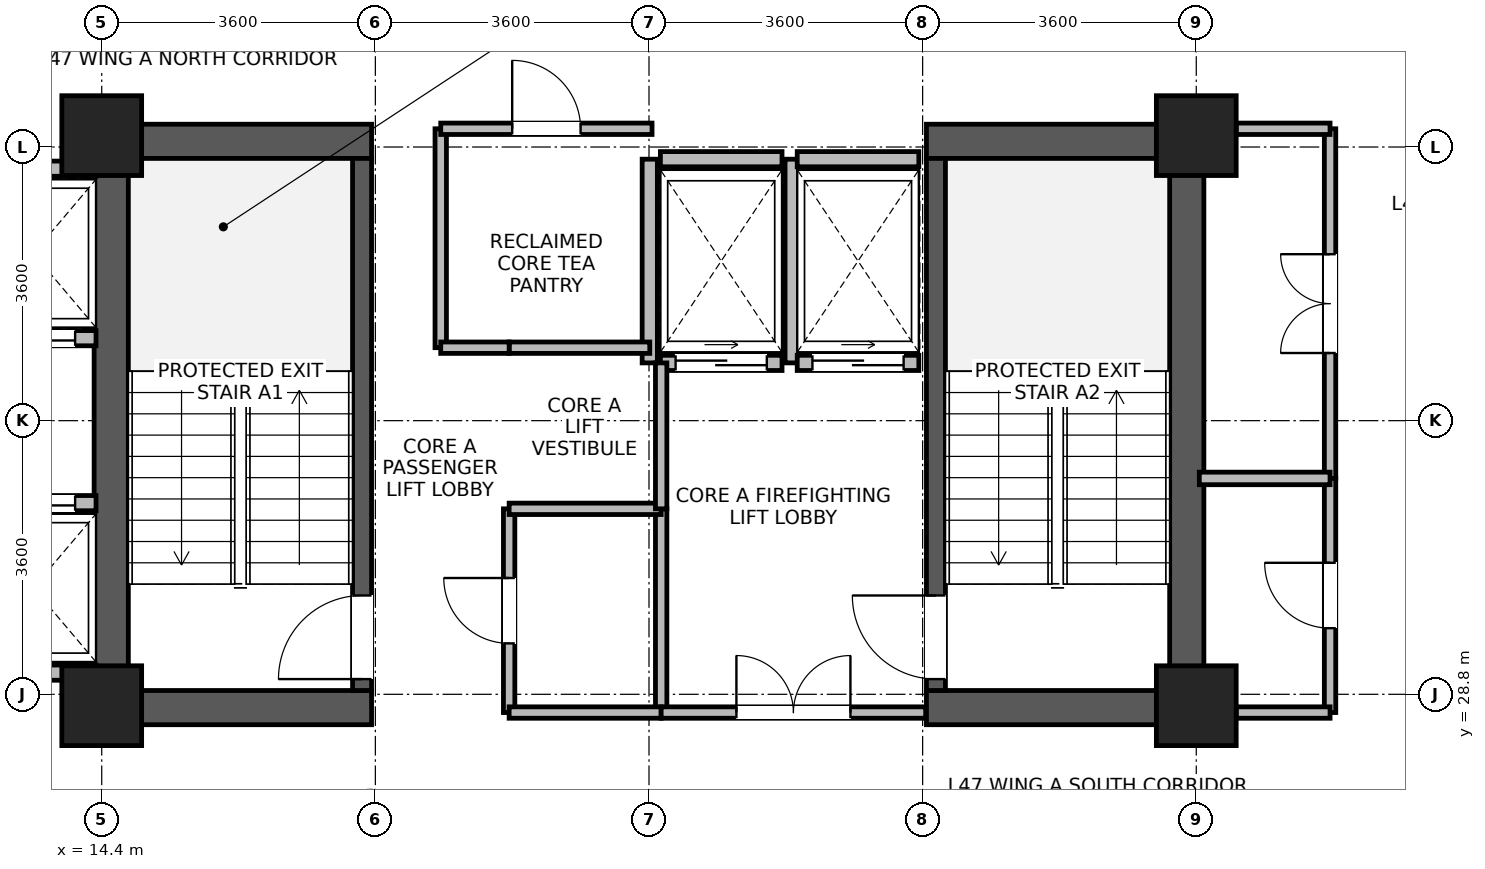
"""IFC4 building model, lengths in metres.
Left out: names, types, materials, properties, quantities, classifications, styles, units other than length and angle.
Written with IfcOpenShell. Run it as: python <this file> out.ifc"""

import sys

from ifc_helpers import new_model, si_unit, direction, frame, frame_2d, origin, origin_2d, place, context, subcontext, project, spatial, rectangle, extrude, source, transform, mapped, element, fill, save


model = new_model("IFC4")
c1 = context("Model", 3, precision=1e-05, world=origin(), true_north=direction((0.0, 1.0)))
c2 = subcontext(c1, "Body", "Model", "MODEL_VIEW")
j1 = project(units=[si_unit("LENGTHUNIT", "METRE"), si_unit("PLANEANGLEUNIT", "RADIAN")], contexts=[c1])
p1 = place(None, origin())
s1 = spatial("IfcSite", under=j1, at=p1, CompositionType="ELEMENT")
p2 = place(p1, origin())
s2 = spatial("IfcBuilding", under=s1, at=p2, CompositionType="ELEMENT")
p3 = place(p2, frame((0.0, 0.0, 184.6)))
s3 = spatial("IfcBuildingStorey", under=s2, at=p3, CompositionType="ELEMENT", Elevation=184.6)
for number, where, z_axis, x_axis in (
    (1, (14.525, 28.4, 0.0), (0.0, 0.0, 1.0), (0.0, 1.0, 0.0)),
    (2, (28.675, 28.4, 0.0), (0.0, 0.0, 1.0), (0.0, 1.0, 0.0)),
):
    element("IfcWall", number, at=place(p3, frame(where, z_axis=z_axis, x_axis=x_axis)), inside=s3, PredefinedType="SHEAR", context=c2, shape_type="SweptSolid", body=[
        extrude(rectangle(XDim=7.9, YDim=0.45, at=frame_2d((3.95, 0.0))), origin(), (0.0, 0.0, 1.0), 3.46),
    ])
for number, where, z_axis, x_axis in (
    (3, (14.75, 28.625, 0.0), (0.0, 0.0, 1.0), (1.0, 0.0, 0.0)),
    (4, (25.25, 28.625, 0.0), (0.0, 0.0, 1.0), (1.0, 0.0, 0.0)),
    (5, (14.75, 36.075, 0.0), (0.0, 0.0, 1.0), (1.0, 0.0, 0.0)),
    (6, (25.25, 36.075, 0.0), (0.0, 0.0, 1.0), (1.0, 0.0, 0.0)),
):
    element("IfcWall", number, at=place(p3, frame(where, z_axis=z_axis, x_axis=x_axis)), inside=s3, PredefinedType="SHEAR", context=c2, shape_type="SweptSolid", body=[
        extrude(rectangle(XDim=3.2, YDim=0.45, at=frame_2d((1.6, 0.0))), origin(), (0.0, 0.0, 1.0), 3.46),
    ])
p4 = place(p3, frame((17.825, 28.85, 0.0), z_axis=(0.0, 0.0, 1.0), x_axis=(0.0, 1.0, 0.0)))
e7 = element("IfcWall", 7, at=p4, inside=s3, PredefinedType="SHEAR", context=c2, shape_type="SweptSolid", body=[
    extrude(rectangle(XDim=7.0, YDim=0.25, at=frame_2d((3.5, 0.0))), origin(), (0.0, 0.0, 1.0), 3.46),
])
p5 = place(p4, frame((0.15, 0.0, 0.0)))
e8 = element("IfcOpeningElement", 8, at=p5, cuts=e7, PredefinedType="OPENING", context=c2, shape_type="SweptSolid", body=[
    extrude(rectangle(XDim=1.1, YDim=2.08, at=frame_2d((0.55, 1.04))), frame((0.0, 0.135, 0.0), z_axis=(0.0, -1.0, 0.0), x_axis=(1.0, 0.0, 0.0)), (0.0, 0.0, 1.0), 0.27),
])
p6 = place(p3, frame((25.375, 28.85, 0.0), z_axis=(0.0, 0.0, 1.0), x_axis=(0.0, 1.0, 0.0)))
e9 = element("IfcWall", 9, at=p6, inside=s3, PredefinedType="SHEAR", context=c2, shape_type="SweptSolid", body=[
    extrude(rectangle(XDim=7.0, YDim=0.25, at=frame_2d((3.5, 0.0))), origin(), (0.0, 0.0, 1.0), 3.46),
])
p7 = place(p6, frame((0.15, 0.0, 0.0)))
e10 = element("IfcOpeningElement", 10, at=p7, cuts=e9, PredefinedType="OPENING", context=c2, shape_type="SweptSolid", body=[
    extrude(rectangle(XDim=1.1, YDim=2.08, at=frame_2d((0.55, 1.04))), frame((0.0, 0.135, 0.0), z_axis=(0.0, -1.0, 0.0), x_axis=(1.0, 0.0, 0.0)), (0.0, 0.0, 1.0), 0.27),
])
m1 = source(origin(), c2, "Body", "SweptSolid", [
    extrude(rectangle(XDim=1.05, YDim=1.05, at=origin_2d()), origin(), (0.0, 0.0, 1.0), 3.7),
])
for number, where, z_axis, x_axis in (
    (11, (14.4, 28.65, 0.0), (0.0, 0.0, 1.0), (1.0, 0.0, 0.0)),
    (12, (14.4, 36.15, 0.0), (0.0, 0.0, 1.0), (1.0, 0.0, 0.0)),
    (13, (28.8, 28.65, 0.0), (0.0, 0.0, 1.0), (1.0, 0.0, 0.0)),
    (14, (28.8, 36.15, 0.0), (0.0, 0.0, 1.0), (1.0, 0.0, 0.0)),
):
    element("IfcColumn", number, at=place(p3, frame(where, z_axis=z_axis, x_axis=x_axis)), inside=s3, PredefinedType="COLUMN", context=c2, shape_type="MappedRepresentation", body=[
        mapped(m1, transform((0.0, 0.0, 0.0), x_axis=(1.0, 0.0, 0.0), y_axis=(0.0, 1.0, 0.0), z_axis=(0.0, 0.0, 1.0), scale=1.0)),
    ])
p8 = place(p3, frame((12.675, 33.485, 0.0), z_axis=(0.0, 0.0, 1.0), x_axis=(1.0, 0.0, 0.0)))
e15 = element("IfcWall", 15, at=p8, inside=s3, PredefinedType="PARTITIONING", context=c2, shape_type="SweptSolid", body=[
    extrude(rectangle(XDim=1.65, YDim=0.2, at=frame_2d((0.825, 0.0))), origin(), (0.0, 0.0, 1.0), 3.44),
])
p9 = place(p8, frame((0.275, 0.0, 0.0)))
e16 = element("IfcOpeningElement", 16, at=p9, cuts=e15, PredefinedType="OPENING", context=c2, shape_type="SweptSolid", body=[
    extrude(rectangle(XDim=1.1, YDim=2.12, at=frame_2d((0.55, 1.06))), frame((0.0, 0.11, 0.0), z_axis=(0.0, -1.0, 0.0), x_axis=(1.0, 0.0, 0.0)), (0.0, 0.0, 1.0), 0.22),
])
for number, where, z_axis, x_axis in (
    (17, (12.675, 35.715, 0.0), (0.0, 0.0, 1.0), (1.0, 0.0, 0.0)),
    (18, (12.675, 29.085, 0.0), (0.0, 0.0, 1.0), (1.0, 0.0, 0.0)),
):
    element("IfcWall", number, at=place(p3, frame(where, z_axis=z_axis, x_axis=x_axis)), inside=s3, PredefinedType="PARTITIONING", context=c2, shape_type="SweptSolid", body=[
        extrude(rectangle(XDim=1.65, YDim=0.2, at=frame_2d((0.825, 0.0))), origin(), (0.0, 0.0, 1.0), 3.44),
    ])
p10 = place(p3, frame((12.675, 31.315, 0.0), z_axis=(0.0, 0.0, 1.0), x_axis=(1.0, 0.0, 0.0)))
e19 = element("IfcWall", 19, at=p10, inside=s3, PredefinedType="PARTITIONING", context=c2, shape_type="SweptSolid", body=[
    extrude(rectangle(XDim=1.65, YDim=0.2, at=frame_2d((0.825, 0.0))), origin(), (0.0, 0.0, 1.0), 3.44),
])
p11 = place(p10, frame((0.275, 0.0, 0.0)))
e20 = element("IfcOpeningElement", 20, at=p11, cuts=e19, PredefinedType="OPENING", context=c2, shape_type="SweptSolid", body=[
    extrude(rectangle(XDim=1.1, YDim=2.12, at=frame_2d((0.55, 1.06))), frame((0.0, 0.11, 0.0), z_axis=(0.0, -1.0, 0.0), x_axis=(1.0, 0.0, 0.0)), (0.0, 0.0, 1.0), 0.22),
])
p12 = place(p3, frame((21.75, 33.16, 0.0), z_axis=(0.0, 0.0, 1.0), x_axis=(1.0, 0.0, 0.0)))
e21 = element("IfcWall", 21, at=p12, inside=s3, PredefinedType="PARTITIONING", context=c2, shape_type="SweptSolid", body=[
    extrude(rectangle(XDim=1.6, YDim=0.2, at=frame_2d((0.8, 0.0))), origin(), (0.0, 0.0, 1.0), 3.44),
])
p13 = place(p12, frame((0.2, 0.0, 0.0)))
e22 = element("IfcOpeningElement", 22, at=p13, cuts=e21, PredefinedType="OPENING", context=c2, shape_type="SweptSolid", body=[
    extrude(rectangle(XDim=1.2, YDim=2.12, at=frame_2d((0.6, 1.06))), frame((0.0, 0.11, 0.0), z_axis=(0.0, -1.0, 0.0), x_axis=(1.0, 0.0, 0.0)), (0.0, 0.0, 1.0), 0.22),
])
p14 = place(p3, frame((21.75, 35.84, 0.0), z_axis=(0.0, 0.0, 1.0), x_axis=(1.0, 0.0, 0.0)))
e23 = element("IfcWall", 23, at=p14, inside=s3, PredefinedType="PARTITIONING", context=c2, shape_type="SweptSolid", body=[
    extrude(rectangle(XDim=1.6, YDim=0.2, at=frame_2d((0.8, 0.0))), origin(), (0.0, 0.0, 1.0), 2.44),
])
for number, where, z_axis, x_axis in (
    (24, (21.61, 33.16, 0.0), (0.0, 0.0, 1.0), (0.0, 1.0, 0.0)),
    (25, (23.49, 33.16, 0.0), (0.0, 0.0, 1.0), (0.0, 1.0, 0.0)),
):
    element("IfcWall", number, at=place(p3, frame(where, z_axis=z_axis, x_axis=x_axis)), inside=s3, PredefinedType="PARTITIONING", context=c2, shape_type="SweptSolid", body=[
        extrude(rectangle(XDim=2.68, YDim=0.2, at=frame_2d((1.34, 0.0))), origin(), (0.0, 0.0, 1.0), 3.44),
    ])
p15 = place(p3, frame((23.55, 33.16, 0.0), z_axis=(0.0, 0.0, 1.0), x_axis=(1.0, 0.0, 0.0)))
e26 = element("IfcWall", 26, at=p15, inside=s3, PredefinedType="PARTITIONING", context=c2, shape_type="SweptSolid", body=[
    extrude(rectangle(XDim=1.6, YDim=0.2, at=frame_2d((0.8, 0.0))), origin(), (0.0, 0.0, 1.0), 3.44),
])
p16 = place(p15, frame((0.2, 0.0, 0.0)))
e27 = element("IfcOpeningElement", 27, at=p16, cuts=e26, PredefinedType="OPENING", context=c2, shape_type="SweptSolid", body=[
    extrude(rectangle(XDim=1.2, YDim=2.12, at=frame_2d((0.6, 1.06))), frame((0.0, 0.11, 0.0), z_axis=(0.0, -1.0, 0.0), x_axis=(1.0, 0.0, 0.0)), (0.0, 0.0, 1.0), 0.22),
])
p17 = place(p3, frame((23.55, 35.84, 0.0), z_axis=(0.0, 0.0, 1.0), x_axis=(1.0, 0.0, 0.0)))
e28 = element("IfcWall", 28, at=p17, inside=s3, PredefinedType="PARTITIONING", context=c2, shape_type="SweptSolid", body=[
    extrude(rectangle(XDim=1.6, YDim=0.2, at=frame_2d((0.8, 0.0))), origin(), (0.0, 0.0, 1.0), 2.44),
])
p18 = place(p3, frame((30.56, 31.64, 0.0), z_axis=(0.0, 0.0, 1.0), x_axis=(0.0, 1.0, 0.0)))
e29 = element("IfcWall", 29, at=p18, inside=s3, PredefinedType="PARTITIONING", context=c2, shape_type="SweptSolid", body=[
    extrude(rectangle(XDim=4.6, YDim=0.15, at=frame_2d((2.3, 0.0))), origin(), (0.0, 0.0, 1.0), 3.44),
])
p19 = place(p18, frame((1.65, 0.0, 0.0)))
e30 = element("IfcOpeningElement", 30, at=p19, cuts=e29, PredefinedType="OPENING", context=c2, shape_type="SweptSolid", body=[
    extrude(rectangle(XDim=1.3, YDim=2.12, at=frame_2d((0.65, 1.06))), frame((0.0, 0.085, 0.0), z_axis=(0.0, -1.0, 0.0), x_axis=(1.0, 0.0, 0.0)), (0.0, 0.0, 1.0), 0.17),
])
p20 = place(p3, frame((30.56, 28.56, 0.0), z_axis=(0.0, 0.0, 1.0), x_axis=(0.0, 1.0, 0.0)))
e31 = element("IfcWall", 31, at=p20, inside=s3, PredefinedType="PARTITIONING", context=c2, shape_type="SweptSolid", body=[
    extrude(rectangle(XDim=3.08, YDim=0.15, at=frame_2d((1.54, 0.0))), origin(), (0.0, 0.0, 1.0), 3.44),
])
p21 = place(p20, frame((1.11, 0.0, 0.0)))
e32 = element("IfcOpeningElement", 32, at=p21, cuts=e31, PredefinedType="OPENING", context=c2, shape_type="SweptSolid", body=[
    extrude(rectangle(XDim=0.86, YDim=2.02, at=frame_2d((0.43, 1.01))), frame((0.0, 0.085, 0.0), z_axis=(0.0, -1.0, 0.0), x_axis=(1.0, 0.0, 0.0)), (0.0, 0.0, 1.0), 0.17),
])
p22 = place(p3, frame((18.86, 33.36, 0.0), z_axis=(0.0, 0.0, 1.0), x_axis=(0.0, 1.0, 0.0)))
e33 = element("IfcWall", 33, at=p22, inside=s3, PredefinedType="PARTITIONING", context=c2, shape_type="SweptSolid", body=[
    extrude(rectangle(XDim=2.88, YDim=0.15, at=frame_2d((1.44, 0.0))), origin(), (0.0, 0.0, 1.0), 3.44),
])
p23 = place(p3, frame((18.86, 36.24, 0.0), z_axis=(0.0, 0.0, 1.0), x_axis=(1.0, 0.0, 0.0)))
e34 = element("IfcWall", 34, at=p23, inside=s3, PredefinedType="PARTITIONING", context=c2, shape_type="SweptSolid", body=[
    extrude(rectangle(XDim=2.78, YDim=0.15, at=frame_2d((1.39, 0.0))), origin(), (0.0, 0.0, 1.0), 2.44),
])
p24 = place(p23, frame((0.94, 0.0, 0.0)))
e35 = element("IfcOpeningElement", 35, at=p24, cuts=e34, PredefinedType="OPENING", context=c2, shape_type="SweptSolid", body=[
    extrude(rectangle(XDim=0.9, YDim=2.08, at=frame_2d((0.45, 1.04))), frame((0.0, 0.085, 0.0), z_axis=(0.0, -1.0, 0.0), x_axis=(1.0, 0.0, 0.0)), (0.0, 0.0, 1.0), 0.17),
])
p25 = place(p3, frame((19.76, 28.56, 0.0), z_axis=(0.0, 0.0, 1.0), x_axis=(0.0, 1.0, 0.0)))
e36 = element("IfcWall", 36, at=p25, inside=s3, PredefinedType="PARTITIONING", context=c2, shape_type="SweptSolid", body=[
    extrude(rectangle(XDim=2.68, YDim=0.15, at=frame_2d((1.34, 0.0))), origin(), (0.0, 0.0, 1.0), 3.44),
])
p26 = place(p25, frame((0.91, 0.0, 0.0)))
e37 = element("IfcOpeningElement", 37, at=p26, cuts=e36, PredefinedType="OPENING", context=c2, shape_type="SweptSolid", body=[
    extrude(rectangle(XDim=0.86, YDim=2.02, at=frame_2d((0.43, 1.01))), frame((0.0, 0.085, 0.0), z_axis=(0.0, -1.0, 0.0), x_axis=(1.0, 0.0, 0.0)), (0.0, 0.0, 1.0), 0.17),
])
p27 = place(p3, frame((21.76, 28.56, 0.0), z_axis=(0.0, 0.0, 1.0), x_axis=(0.0, 1.0, 0.0)))
e38 = element("IfcWall", 38, at=p27, inside=s3, PredefinedType="PARTITIONING", context=c2, shape_type="SweptSolid", body=[
    extrude(rectangle(XDim=2.68, YDim=0.15, at=frame_2d((1.34, 0.0))), origin(), (0.0, 0.0, 1.0), 3.44),
])
p28 = place(p3, frame((19.76, 28.56, 0.0), z_axis=(0.0, 0.0, 1.0), x_axis=(1.0, 0.0, 0.0)))
e39 = element("IfcWall", 39, at=p28, inside=s3, PredefinedType="PARTITIONING", context=c2, shape_type="SweptSolid", body=[
    extrude(rectangle(XDim=2.0, YDim=0.15, at=frame_2d((1.0, 0.0))), origin(), (0.0, 0.0, 1.0), 2.44),
])
p29 = place(p3, frame((19.76, 31.24, 0.0), z_axis=(0.0, 0.0, 1.0), x_axis=(1.0, 0.0, 0.0)))
e40 = element("IfcWall", 40, at=p29, inside=s3, PredefinedType="PARTITIONING", context=c2, shape_type="SweptSolid", body=[
    extrude(rectangle(XDim=2.0, YDim=0.15, at=frame_2d((1.0, 0.0))), origin(), (0.0, 0.0, 1.0), 3.44),
])
p30 = place(p3, frame((19.76, 33.36, 0.0), z_axis=(0.0, 0.0, 1.0), x_axis=(1.0, 0.0, 0.0)))
e41 = element("IfcWall", 41, at=p30, inside=s3, PredefinedType="PARTITIONING", context=c2, shape_type="SweptSolid", body=[
    extrude(rectangle(XDim=1.85, YDim=0.15, at=frame_2d((0.925, 0.0))), origin(), (0.0, 0.0, 1.0), 3.44),
])
for number, where, z_axis, x_axis in (
    (42, (29.325, 28.56, 0.0), (0.0, 0.0, 1.0), (1.0, 0.0, 0.0)),
    (43, (29.325, 36.24, 0.0), (0.0, 0.0, 1.0), (1.0, 0.0, 0.0)),
):
    element("IfcWall", number, at=place(p3, frame(where, z_axis=z_axis, x_axis=x_axis)), inside=s3, PredefinedType="PARTITIONING", context=c2, shape_type="SweptSolid", body=[
        extrude(rectangle(XDim=1.235, YDim=0.15, at=frame_2d((0.618, 0.0))), origin(), (0.0, 0.0, 1.0), 2.84),
    ])
p31 = place(p3, frame((18.86, 33.36, 0.0), z_axis=(0.0, 0.0, 1.0), x_axis=(1.0, 0.0, 0.0)))
e44 = element("IfcWall", 44, at=p31, inside=s3, PredefinedType="PARTITIONING", context=c2, shape_type="SweptSolid", body=[
    extrude(rectangle(XDim=0.9, YDim=0.15, at=frame_2d((0.45, 0.0))), origin(), (0.0, 0.0, 1.0), 3.44),
])
p32 = place(p3, frame((21.76, 28.56, 0.0), z_axis=(0.0, 0.0, 1.0), x_axis=(1.0, 0.0, 0.0)))
e45 = element("IfcWall", 45, at=p32, inside=s3, PredefinedType="PARTITIONING", context=c2, shape_type="SweptSolid", body=[
    extrude(rectangle(XDim=3.48, YDim=0.15, at=frame_2d((1.74, 0.0))), origin(), (0.0, 0.0, 1.0), 2.44),
])
p33 = place(p32, frame((0.99, 0.0, 0.0)))
e46 = element("IfcOpeningElement", 46, at=p33, cuts=e45, PredefinedType="OPENING", context=c2, shape_type="SweptSolid", body=[
    extrude(rectangle(XDim=1.5, YDim=2.1, at=frame_2d((0.75, 1.05))), frame((0.0, 0.085, 0.0), z_axis=(0.0, -1.0, 0.0), x_axis=(1.0, 0.0, 0.0)), (0.0, 0.0, 1.0), 0.17),
])
p34 = place(p3, frame((21.76, 31.24, 0.0), z_axis=(0.0, 0.0, 1.0), x_axis=(0.0, 1.0, 0.0)))
e47 = element("IfcWall", 47, at=p34, inside=s3, PredefinedType="PARTITIONING", context=c2, shape_type="SweptSolid", body=[
    extrude(rectangle(XDim=1.92, YDim=0.15, at=frame_2d((0.96, 0.0))), origin(), (0.0, 0.0, 1.0), 3.44),
])
p35 = place(p3, frame((28.84, 31.64, 0.0), z_axis=(0.0, 0.0, 1.0), x_axis=(1.0, 0.0, 0.0)))
e48 = element("IfcWall", 48, at=p35, inside=s3, PredefinedType="PARTITIONING", context=c2, shape_type="SweptSolid", body=[
    extrude(rectangle(XDim=1.72, YDim=0.165, at=frame_2d((0.86, 0.0))), origin(), (0.0, 0.0, 1.0), 3.44),
])
p36 = place(p5, origin())
e49 = element("IfcDoor", 49, at=p36, inside=s3, OperationType="SINGLE_SWING_LEFT", PredefinedType="DOOR", context=c2, shape_type="SweptSolid", body=[
    extrude(rectangle(XDim=1.1, YDim=2.08, at=frame_2d((0.55, 1.04))), frame((0.0, 0.025, 0.0), z_axis=(0.0, -1.0, 0.0), x_axis=(1.0, 0.0, 0.0)), (0.0, 0.0, 1.0), 0.05),
])
fill(e8, e49)
p37 = place(p7, origin())
e50 = element("IfcDoor", 50, at=p37, inside=s3, OperationType="SINGLE_SWING_RIGHT", PredefinedType="DOOR", context=c2, shape_type="SweptSolid", body=[
    extrude(rectangle(XDim=1.1, YDim=2.08, at=frame_2d((0.55, 1.04))), frame((0.0, 0.025, 0.0), z_axis=(0.0, -1.0, 0.0), x_axis=(1.0, 0.0, 0.0)), (0.0, 0.0, 1.0), 0.05),
])
fill(e10, e50)
p38 = place(p9, origin())
e51 = element("IfcDoor", 51, at=p38, inside=s3, OperationType="SLIDING_TO_LEFT", PredefinedType="DOOR", context=c2, shape_type="SweptSolid", body=[
    extrude(rectangle(XDim=1.1, YDim=2.12, at=frame_2d((0.55, 1.06))), frame((0.0, 0.025, 0.0), z_axis=(0.0, -1.0, 0.0), x_axis=(1.0, 0.0, 0.0)), (0.0, 0.0, 1.0), 0.05),
])
fill(e16, e51)
p39 = place(p11, origin())
e52 = element("IfcDoor", 52, at=p39, inside=s3, OperationType="SLIDING_TO_LEFT", PredefinedType="DOOR", context=c2, shape_type="SweptSolid", body=[
    extrude(rectangle(XDim=1.1, YDim=2.12, at=frame_2d((0.55, 1.06))), frame((0.0, 0.025, 0.0), z_axis=(0.0, -1.0, 0.0), x_axis=(1.0, 0.0, 0.0)), (0.0, 0.0, 1.0), 0.05),
])
fill(e20, e52)
p40 = place(p13, origin())
e53 = element("IfcDoor", 53, at=p40, inside=s3, OperationType="SLIDING_TO_RIGHT", PredefinedType="DOOR", context=c2, shape_type="SweptSolid", body=[
    extrude(rectangle(XDim=1.2, YDim=2.12, at=frame_2d((0.6, 1.06))), frame((0.0, 0.025, 0.0), z_axis=(0.0, -1.0, 0.0), x_axis=(1.0, 0.0, 0.0)), (0.0, 0.0, 1.0), 0.05),
])
fill(e22, e53)
p41 = place(p16, origin())
e54 = element("IfcDoor", 54, at=p41, inside=s3, OperationType="SLIDING_TO_RIGHT", PredefinedType="DOOR", context=c2, shape_type="SweptSolid", body=[
    extrude(rectangle(XDim=1.2, YDim=2.12, at=frame_2d((0.6, 1.06))), frame((0.0, 0.025, 0.0), z_axis=(0.0, -1.0, 0.0), x_axis=(1.0, 0.0, 0.0)), (0.0, 0.0, 1.0), 0.05),
])
fill(e27, e54)
p42 = place(p19, origin())
e55 = element("IfcDoor", 55, at=p42, inside=s3, OperationType="DOUBLE_DOOR_SINGLE_SWING", PredefinedType="DOOR", context=c2, shape_type="SweptSolid", body=[
    extrude(rectangle(XDim=1.3, YDim=2.12, at=frame_2d((0.65, 1.06))), frame((0.0, 0.025, 0.0), z_axis=(0.0, -1.0, 0.0), x_axis=(1.0, 0.0, 0.0)), (0.0, 0.0, 1.0), 0.05),
])
fill(e30, e55)
p43 = place(p21, origin())
e56 = element("IfcDoor", 56, at=p43, inside=s3, OperationType="SINGLE_SWING_RIGHT", PredefinedType="DOOR", context=c2, shape_type="SweptSolid", body=[
    extrude(rectangle(XDim=0.86, YDim=2.02, at=frame_2d((0.43, 1.01))), frame((0.0, 0.025, 0.0), z_axis=(0.0, -1.0, 0.0), x_axis=(1.0, 0.0, 0.0)), (0.0, 0.0, 1.0), 0.05),
])
fill(e32, e56)
p44 = place(p24, origin())
e57 = element("IfcDoor", 57, at=p44, inside=s3, OperationType="SINGLE_SWING_LEFT", PredefinedType="DOOR", context=c2, shape_type="SweptSolid", body=[
    extrude(rectangle(XDim=0.9, YDim=2.08, at=frame_2d((0.45, 1.04))), frame((0.0, 0.025, 0.0), z_axis=(0.0, -1.0, 0.0), x_axis=(1.0, 0.0, 0.0)), (0.0, 0.0, 1.0), 0.05),
])
fill(e35, e57)
p45 = place(p26, origin())
e58 = element("IfcDoor", 58, at=p45, inside=s3, OperationType="SINGLE_SWING_RIGHT", PredefinedType="DOOR", context=c2, shape_type="SweptSolid", body=[
    extrude(rectangle(XDim=0.86, YDim=2.02, at=frame_2d((0.43, 1.01))), frame((0.0, 0.025, 0.0), z_axis=(0.0, -1.0, 0.0), x_axis=(1.0, 0.0, 0.0)), (0.0, 0.0, 1.0), 0.05),
])
fill(e37, e58)
p46 = place(p33, origin())
e59 = element("IfcDoor", 59, at=p46, inside=s3, OperationType="DOUBLE_DOOR_SINGLE_SWING", PredefinedType="DOOR", context=c2, shape_type="SweptSolid", body=[
    extrude(rectangle(XDim=1.5, YDim=2.1, at=frame_2d((0.75, 1.05))), frame((0.0, 0.025, 0.0), z_axis=(0.0, -1.0, 0.0), x_axis=(1.0, 0.0, 0.0)), (0.0, 0.0, 1.0), 0.05),
])
fill(e46, e59)
save(model, sys.argv[1])
